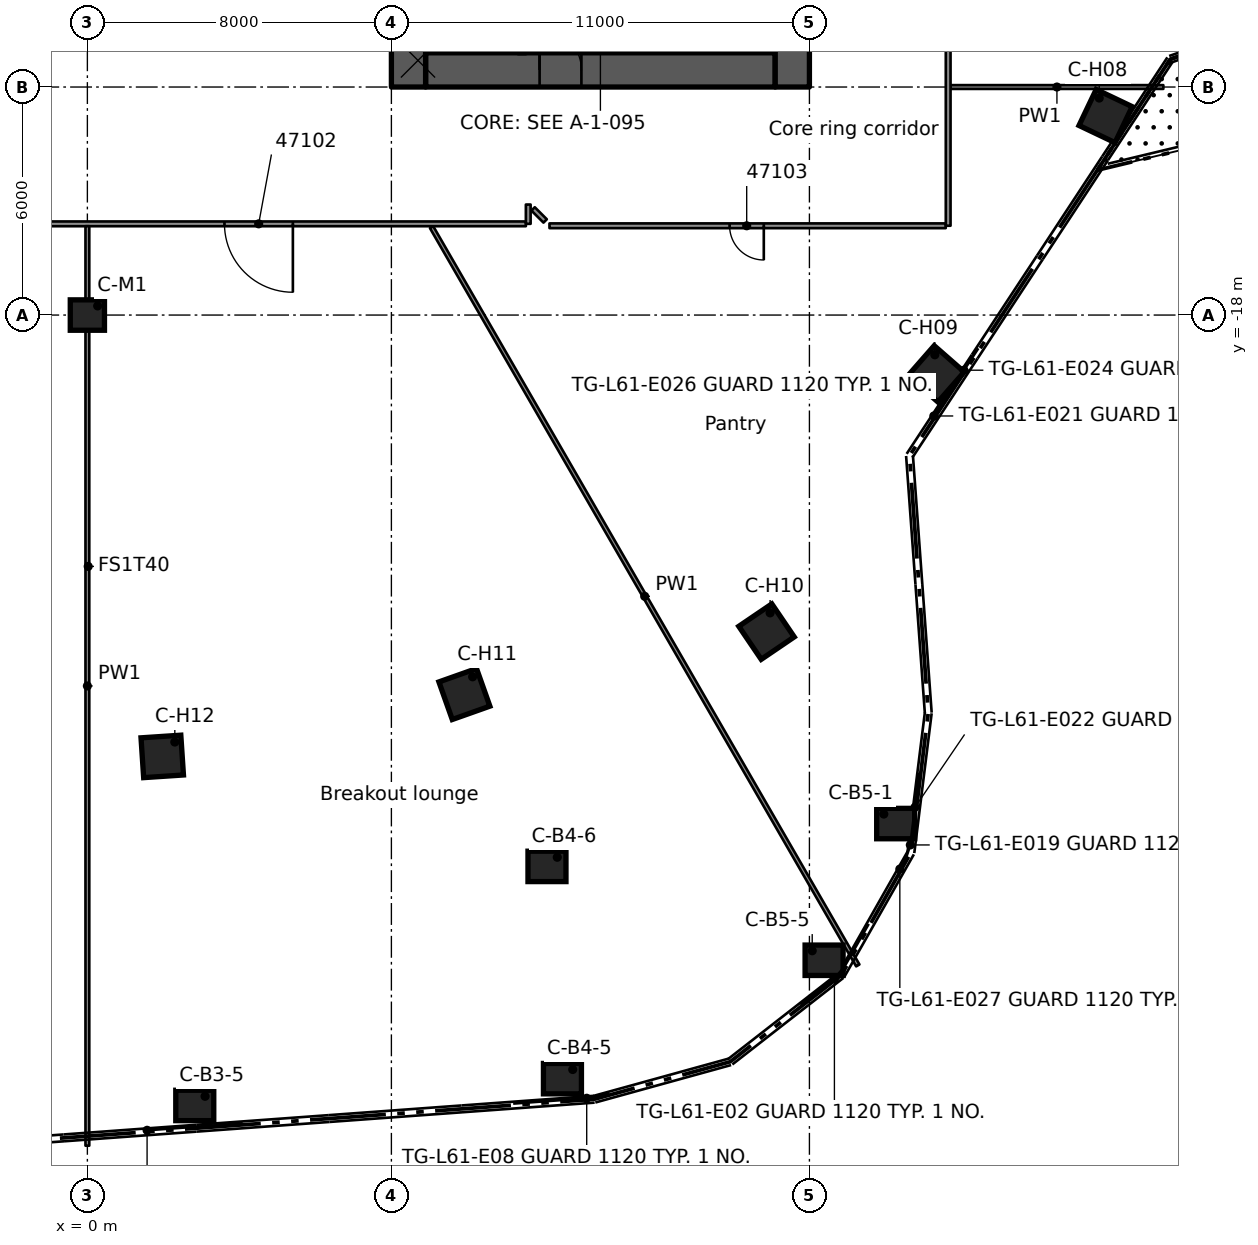
"""IFC4 building model, lengths in metres.
Left out: names, types, materials, properties, quantities, classifications, styles, units other than length and angle.
Written with IfcOpenShell. Run it as: python <this file> out.ifc"""

import sys

from ifc_helpers import new_model, si_unit, direction, frame, frame_2d, origin, origin_2d, place, context, subcontext, project, spatial, rectangle, extrude, element, fill, save


model = new_model("IFC4")
c1 = context("Model", 3, precision=1e-05, world=origin(), true_north=direction((0.0, 1.0)))
c2 = subcontext(c1, "Body", "Model", "MODEL_VIEW")
j1 = project(units=[si_unit("LENGTHUNIT", "METRE"), si_unit("PLANEANGLEUNIT", "RADIAN")], contexts=[c1])
p1 = place(None, origin())
s1 = spatial("IfcSite", under=j1, at=p1, CompositionType="ELEMENT")
p2 = place(p1, origin())
s2 = spatial("IfcBuilding", under=s1, at=p2, CompositionType="ELEMENT")
p3 = place(p2, frame((0.0, 0.0, 232.0)))
s3 = spatial("IfcBuildingStorey", under=s2, at=p3, CompositionType="ELEMENT", Elevation=232.0)
p4 = place(p3, frame((8.9, -11.55, 0.0), z_axis=(0.0, 0.0, 1.0), x_axis=(1.0, 0.0, 0.0)))
e1 = element("IfcWall", 1, at=p4, inside=s3, PredefinedType="SHEAR", context=c2, shape_type="SweptSolid", body=[
    extrude(rectangle(XDim=9.2, YDim=0.9, at=frame_2d((4.6, 0.0))), origin(), (0.0, 0.0, 1.0), 3.5),
])
p5 = place(p4, frame((3.0, 0.0, 0.0)))
e2 = element("IfcOpeningElement", 2, at=p5, cuts=e1, PredefinedType="OPENING", context=c2, shape_type="SweptSolid", body=[
    extrude(rectangle(XDim=1.1, YDim=2.1, at=frame_2d((0.55, 1.05))), frame((0.0, 0.46, 0.0), z_axis=(0.0, -1.0, 0.0), x_axis=(1.0, 0.0, 0.0)), (0.0, 0.0, 1.0), 0.92),
])
p6 = place(p3, frame((8.45, -12.0, 0.0), z_axis=(0.0, 0.0, 1.0), x_axis=(0.0, 1.0, 0.0)))
e3 = element("IfcWall", 3, at=p6, inside=s3, PredefinedType="SHEAR", context=c2, shape_type="SweptSolid", body=[
    extrude(rectangle(XDim=24.0, YDim=0.9, at=frame_2d((12.0, 0.0))), origin(), (0.0, 0.0, 1.0), 3.5),
])
p7 = place(p6, frame((12.6, 0.0, 0.0)))
e4 = element("IfcOpeningElement", 4, at=p7, cuts=e3, PredefinedType="OPENING", context=c2, shape_type="SweptSolid", body=[
    extrude(rectangle(XDim=1.8, YDim=2.1, at=frame_2d((0.9, 1.05))), frame((0.0, 0.46, 0.0), z_axis=(0.0, -1.0, 0.0), x_axis=(1.0, 0.0, 0.0)), (0.0, 0.0, 1.0), 0.92),
])
p8 = place(p6, frame((3.25, 0.0, 0.0)))
e5 = element("IfcOpeningElement", 5, at=p8, cuts=e3, PredefinedType="OPENING", context=c2, shape_type="SweptSolid", body=[
    extrude(rectangle(XDim=1.1, YDim=2.1, at=frame_2d((0.55, 1.05))), frame((0.0, 0.46, 0.0), z_axis=(0.0, -1.0, 0.0), x_axis=(1.0, 0.0, 0.0)), (0.0, 0.0, 1.0), 0.92),
])
p9 = place(p6, frame((21.0, 0.0, 0.0)))
e6 = element("IfcOpeningElement", 6, at=p9, cuts=e3, PredefinedType="OPENING", context=c2, shape_type="SweptSolid", body=[
    extrude(rectangle(XDim=0.8, YDim=2.1, at=frame_2d((0.4, 1.05))), frame((0.0, 0.46, 0.0), z_axis=(0.0, -1.0, 0.0), x_axis=(1.0, 0.0, 0.0)), (0.0, 0.0, 1.0), 0.92),
])
p10 = place(p3, frame((18.55, -12.0, 0.0), z_axis=(0.0, 0.0, 1.0), x_axis=(0.0, 1.0, 0.0)))
e7 = element("IfcWall", 7, at=p10, inside=s3, PredefinedType="SHEAR", context=c2, shape_type="SweptSolid", body=[
    extrude(rectangle(XDim=24.0, YDim=0.9, at=frame_2d((12.0, 0.0))), origin(), (0.0, 0.0, 1.0), 3.5),
])
p11 = place(p10, frame((12.1, 0.0, 0.0)))
e8 = element("IfcOpeningElement", 8, at=p11, cuts=e7, PredefinedType="OPENING", context=c2, shape_type="SweptSolid", body=[
    extrude(rectangle(XDim=1.8, YDim=2.1, at=frame_2d((0.9, 1.05))), frame((0.0, 0.46, 0.0), z_axis=(0.0, -1.0, 0.0), x_axis=(1.0, 0.0, 0.0)), (0.0, 0.0, 1.0), 0.92),
])
for number, where, z_axis, x_axis in (
    (9, (2.826, -38.797, 0.0), (0.0, 0.0, 1.0), (1.0, 0.0, 0.0)),
    (10, (12.501, -38.092, 0.0), (0.0, 0.0, 1.0), (1.0, 0.0, 0.0)),
    (11, (12.094, -32.507, 0.0), (0.0, 0.0, 1.0), (1.0, 0.0, 0.0)),
    (12, (21.27, -31.38, 0.0), (0.0, 0.0, 1.0), (1.0, 0.0, 0.0)),
    (13, (19.386, -34.977, 0.0), (0.0, 0.0, 1.0), (1.0, 0.0, 0.0)),
):
    element("IfcColumn", number, at=place(p3, frame(where, z_axis=z_axis, x_axis=x_axis)), inside=s3, PredefinedType="COLUMN", context=c2, shape_type="SweptSolid", body=[
        extrude(rectangle(XDim=1.0, YDim=0.8, at=origin_2d()), origin(), (0.0, 0.0, 1.0), 3.5),
    ])
for number, where, z_axis, x_axis in (
    (14, (26.794, -12.764, 0.0), (0.0, 0.0, 1.0), (0.903, -0.43, 0.0)),
    (15, (22.333, -19.547, 0.0), (0.0, 0.0, 1.0), (0.752, -0.659, 0.0)),
    (16, (17.871, -26.33, 0.0), (0.0, 0.0, 1.0), (0.562, -0.827, 0.0)),
    (17, (9.921, -27.972, 0.0), (0.0, 0.0, 1.0), (0.334, -0.942, 0.0)),
    (18, (1.97, -29.613, 0.0), (0.0, 0.0, 1.0), (0.066, -0.998, 0.0)),
):
    element("IfcColumn", number, at=place(p3, frame(where, z_axis=z_axis, x_axis=x_axis)), inside=s3, PredefinedType="COLUMN", context=c2, shape_type="SweptSolid", body=[
        extrude(rectangle(XDim=1.05, YDim=1.05, at=origin_2d()), origin(), (0.0, 0.0, 1.0), 3.5),
    ])
p12 = place(p3, frame((0.0, -18.0, 0.0), z_axis=(0.0, 0.0, 1.0), x_axis=(1.0, 0.0, 0.0)))
e19 = element("IfcColumn", 19, at=p12, inside=s3, PredefinedType="COLUMN", context=c2, shape_type="SweptSolid", body=[
    extrude(rectangle(XDim=0.9, YDim=0.8, at=origin_2d()), origin(), (0.0, 0.0, 1.0), 3.5),
])
p13 = place(p3, frame((11.44, -6.975, 0.0), z_axis=(0.0, 0.0, 1.0), x_axis=(0.0, -1.0, 0.0)))
e20 = element("IfcWall", 20, at=p13, inside=s3, PredefinedType="SOLIDWALL", context=c2, shape_type="SweptSolid", body=[
    extrude(rectangle(XDim=4.125, YDim=0.2, at=frame_2d((2.062, 0.0))), origin(), (0.0, 0.0, 1.0), 3.09),
])
p14 = place(p13, frame((2.1, 0.0, 0.0)))
e21 = element("IfcOpeningElement", 21, at=p14, cuts=e20, PredefinedType="OPENING", context=c2, shape_type="SweptSolid", body=[
    extrude(rectangle(XDim=1.1, YDim=2.1, at=frame_2d((0.55, 1.05))), frame((0.0, 0.11, 0.0), z_axis=(0.0, -1.0, 0.0), x_axis=(1.0, 0.0, 0.0)), (0.0, 0.0, 1.0), 0.22),
])
p15 = place(p3, frame((9.058, -15.688, 0.0), z_axis=(0.0, 0.0, 1.0), x_axis=(0.499992863786, -0.86602952384, 0.0)))
e22 = element("IfcWall", 22, at=p15, inside=s3, PredefinedType="PARTITIONING", context=c2, shape_type="SweptSolid", body=[
    extrude(rectangle(XDim=22.43, YDim=0.1, at=frame_2d((11.215, 0.0))), origin(), (0.0, 0.0, 1.0), 3.08),
])
p16 = place(p3, frame((11.729, -15.207, 0.0), z_axis=(0.0, 0.0, 1.0), x_axis=(0.707106781187, -0.707106781187, 0.0)))
e23 = element("IfcWall", 23, at=p16, inside=s3, PredefinedType="PARTITIONING", context=c2, shape_type="SweptSolid", body=[
    extrude(rectangle(XDim=0.448, YDim=0.125, at=frame_2d((0.224, 0.0))), origin(), (0.0, 0.0, 1.0), 3.08),
])
p17 = place(p3, frame((22.587, -15.651, 0.0), z_axis=(0.0, 0.0, 1.0), x_axis=(-1.0, 0.0, 0.0)))
e24 = element("IfcWall", 24, at=p17, inside=s3, PredefinedType="PARTITIONING", context=c2, shape_type="SweptSolid", body=[
    extrude(rectangle(XDim=10.427, YDim=0.125, at=frame_2d((5.213, 0.0))), origin(), (0.0, 0.0, 1.0), 3.08),
])
p18 = place(p17, frame((4.788, 0.0, 0.0)))
e25 = element("IfcOpeningElement", 25, at=p18, cuts=e24, PredefinedType="OPENING", context=c2, shape_type="SweptSolid", body=[
    extrude(rectangle(XDim=0.9, YDim=2.1, at=frame_2d((0.45, 1.05))), frame((0.0, 0.073, 0.0), z_axis=(0.0, -1.0, 0.0), x_axis=(1.0, 0.0, 0.0)), (0.0, 0.0, 1.0), 0.145),
])
p19 = place(p3, frame((11.539, -15.6, 0.0), z_axis=(0.0, 0.0, 1.0), x_axis=(-1.0, 0.0, 0.0)))
e26 = element("IfcWall", 26, at=p19, inside=s3, PredefinedType="PARTITIONING", context=c2, shape_type="SweptSolid", body=[
    extrude(rectangle(XDim=23.139, YDim=0.125, at=frame_2d((11.57, 0.0))), origin(), (0.0, 0.0, 1.0), 3.08),
])
p20 = place(p19, frame((15.138, 0.0, 0.0)))
e27 = element("IfcOpeningElement", 27, at=p20, cuts=e26, PredefinedType="OPENING", context=c2, shape_type="SweptSolid", body=[
    extrude(rectangle(XDim=1.8, YDim=2.1, at=frame_2d((0.9, 1.05))), frame((0.0, 0.073, 0.0), z_axis=(0.0, -1.0, 0.0), x_axis=(1.0, 0.0, 0.0)), (0.0, 0.0, 1.0), 0.145),
])
p21 = place(p19, frame((6.132, 0.0, 0.0)))
e28 = element("IfcOpeningElement", 28, at=p21, cuts=e26, PredefinedType="OPENING", context=c2, shape_type="SweptSolid", body=[
    extrude(rectangle(XDim=1.8, YDim=2.1, at=frame_2d((0.9, 1.05))), frame((0.0, 0.073, 0.0), z_axis=(0.0, -1.0, 0.0), x_axis=(1.0, 0.0, 0.0)), (0.0, 0.0, 1.0), 0.145),
])
p22 = place(p3, frame((22.713, -12.0, 0.0), z_axis=(0.0, 0.0, 1.0), x_axis=(1.0, 0.0, 0.0)))
e29 = element("IfcWall", 29, at=p22, inside=s3, PredefinedType="PARTITIONING", context=c2, shape_type="SweptSolid", body=[
    extrude(rectangle(XDim=5.6, YDim=0.1, at=frame_2d((2.8, 0.0))), origin(), (0.0, 0.0, 1.0), 3.08),
])
p23 = place(p3, frame((22.651, 15.65, 0.0), z_axis=(0.0, 0.0, 1.0), x_axis=(0.0, -1.0, 0.0)))
e30 = element("IfcWall", 30, at=p23, inside=s3, PredefinedType="PARTITIONING", context=c2, shape_type="SweptSolid", body=[
    extrude(rectangle(XDim=31.3, YDim=0.125, at=frame_2d((15.65, 0.0))), origin(), (0.0, 0.0, 1.0), 3.08),
])
p24 = place(p23, frame((25.25, 0.0, 0.0)))
e31 = element("IfcOpeningElement", 31, at=p24, cuts=e30, PredefinedType="OPENING", context=c2, shape_type="SweptSolid", body=[
    extrude(rectangle(XDim=0.9, YDim=2.1, at=frame_2d((0.45, 1.05))), frame((0.0, 0.073, 0.0), z_axis=(0.0, -1.0, 0.0), x_axis=(1.0, 0.0, 0.0)), (0.0, 0.0, 1.0), 0.145),
])
p25 = place(p23, frame((21.25, 0.0, 0.0)))
e32 = element("IfcOpeningElement", 32, at=p25, cuts=e30, PredefinedType="OPENING", context=c2, shape_type="SweptSolid", body=[
    extrude(rectangle(XDim=0.9, YDim=2.1, at=frame_2d((0.45, 1.05))), frame((0.0, 0.073, 0.0), z_axis=(0.0, -1.0, 0.0), x_axis=(1.0, 0.0, 0.0)), (0.0, 0.0, 1.0), 0.145),
])
p26 = place(p23, frame((9.25, 0.0, 0.0)))
e33 = element("IfcOpeningElement", 33, at=p26, cuts=e30, PredefinedType="OPENING", context=c2, shape_type="SweptSolid", body=[
    extrude(rectangle(XDim=0.9, YDim=2.1, at=frame_2d((0.45, 1.05))), frame((0.0, 0.073, 0.0), z_axis=(0.0, -1.0, 0.0), x_axis=(1.0, 0.0, 0.0)), (0.0, 0.0, 1.0), 0.145),
])
p27 = place(p23, frame((0.85, 0.0, 0.0)))
e34 = element("IfcOpeningElement", 34, at=p27, cuts=e30, PredefinedType="OPENING", context=c2, shape_type="SweptSolid", body=[
    extrude(rectangle(XDim=1.8, YDim=2.1, at=frame_2d((0.9, 1.05))), frame((0.0, 0.073, 0.0), z_axis=(0.0, -1.0, 0.0), x_axis=(1.0, 0.0, 0.0)), (0.0, 0.0, 1.0), 0.145),
])
p28 = place(p3, frame((11.601, -15.6, 0.0), z_axis=(0.0, 0.0, 1.0), x_axis=(0.0, 1.0, 0.0)))
e35 = element("IfcWall", 35, at=p28, inside=s3, PredefinedType="PARTITIONING", context=c2, shape_type="SweptSolid", body=[
    extrude(rectangle(XDim=0.508, YDim=0.125, at=frame_2d((0.254, 0.0))), origin(), (0.0, 0.0, 1.0), 3.08),
])
p29 = place(p3, frame((0.0, -39.856, 0.0), z_axis=(0.0, 0.0, 1.0), x_axis=(0.0, 1.0, 0.0)))
e36 = element("IfcWall", 36, at=p29, inside=s3, PredefinedType="PARTITIONING", context=c2, shape_type="SweptSolid", body=[
    extrude(rectangle(XDim=24.194, YDim=0.1, at=frame_2d((12.097, 0.0))), origin(), (0.0, 0.0, 1.0), 3.08),
])
p30 = place(p5, origin())
e37 = element("IfcDoor", 37, at=p30, inside=s3, OperationType="SINGLE_SWING_LEFT", PredefinedType="DOOR", context=c2, shape_type="SweptSolid", body=[
    extrude(rectangle(XDim=1.1, YDim=2.1, at=frame_2d((0.55, 1.05))), frame((0.0, 0.025, 0.0), z_axis=(0.0, -1.0, 0.0), x_axis=(1.0, 0.0, 0.0)), (0.0, 0.0, 1.0), 0.05),
])
fill(e2, e37)
p31 = place(p21, origin())
e38 = element("IfcDoor", 38, at=p31, inside=s3, OperationType="DOUBLE_DOOR_SINGLE_SWING", PredefinedType="DOOR", context=c2, shape_type="SweptSolid", body=[
    extrude(rectangle(XDim=1.8, YDim=2.1, at=frame_2d((0.9, 1.05))), frame((0.0, 0.025, 0.0), z_axis=(0.0, -1.0, 0.0), x_axis=(1.0, 0.0, 0.0)), (0.0, 0.0, 1.0), 0.05),
])
fill(e28, e38)
p32 = place(p18, origin())
e39 = element("IfcDoor", 39, at=p32, inside=s3, OperationType="SINGLE_SWING_RIGHT", PredefinedType="DOOR", context=c2, shape_type="SweptSolid", body=[
    extrude(rectangle(XDim=0.9, YDim=2.1, at=frame_2d((0.45, 1.05))), frame((0.0, 0.025, 0.0), z_axis=(0.0, -1.0, 0.0), x_axis=(1.0, 0.0, 0.0)), (0.0, 0.0, 1.0), 0.05),
])
fill(e25, e39)
save(model, sys.argv[1])
